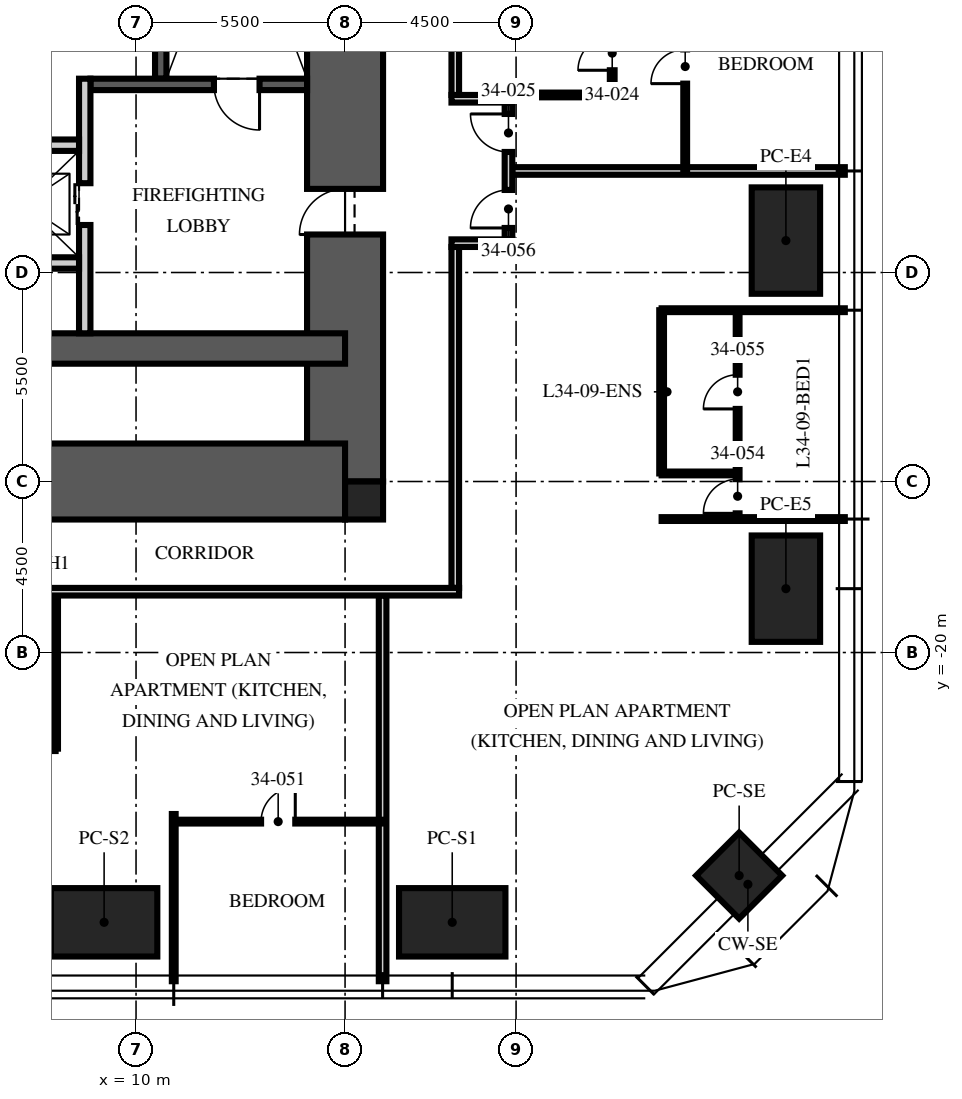
"""IFC4 building model, lengths in metres.
Left out: names, types, materials, properties, quantities, classifications, styles, units other than length and angle.
Written with IfcOpenShell. Run it as: python <this file> out.ifc"""

import sys

from ifc_helpers import new_model, si_unit, direction, frame, frame_2d, origin, origin_2d, place, context, subcontext, project, spatial, rectangle, extrude, element, fill, save


model = new_model("IFC4")
c1 = context("Model", 3, precision=1e-05, world=origin(), true_north=direction((0.0, 1.0)))
c2 = subcontext(c1, "Body", "Model", "MODEL_VIEW")
j1 = project(units=[si_unit("LENGTHUNIT", "METRE"), si_unit("PLANEANGLEUNIT", "RADIAN")], contexts=[c1])
p1 = place(None, origin())
s1 = spatial("IfcSite", under=j1, at=p1, CompositionType="ELEMENT")
p2 = place(p1, origin())
s2 = spatial("IfcBuilding", under=s1, at=p2, CompositionType="ELEMENT")
p3 = place(p2, frame((0.0, 0.0, 137.25)))
s3 = spatial("IfcBuildingStorey", under=s2, at=p3, CompositionType="ELEMENT", Elevation=137.25)
p4 = place(p3, frame((15.5, -15.5, -0.25), z_axis=(0.0, 0.0, 1.0), x_axis=(0.0, 1.0, 0.0)))
e1 = element("IfcWall", 1, at=p4, inside=s3, PredefinedType="SHEAR", context=c2, shape_type="SweptSolid", body=[
    extrude(rectangle(XDim=31.0, YDim=2.0, at=frame_2d((15.5, 0.0))), origin(), (0.0, 0.0, 1.0), 3.75),
])
p5 = place(p4, frame((6.5, 0.0, 0.25)))
e2 = element("IfcOpeningElement", 2, at=p5, cuts=e1, PredefinedType="OPENING", context=c2, shape_type="SweptSolid", body=[
    extrude(rectangle(XDim=1.2, YDim=2.1, at=frame_2d((0.6, 1.05))), frame((0.0, 1.01, 0.0), z_axis=(0.0, -1.0, 0.0), x_axis=(1.0, 0.0, 0.0)), (0.0, 0.0, 1.0), 2.02),
])
p6 = place(p4, frame((23.0, 0.0, 0.25)))
e3 = element("IfcOpeningElement", 3, at=p6, cuts=e1, PredefinedType="OPENING", context=c2, shape_type="SweptSolid", body=[
    extrude(rectangle(XDim=1.8, YDim=2.1, at=frame_2d((0.9, 1.05))), frame((0.0, 1.01, 0.0), z_axis=(0.0, -1.0, 0.0), x_axis=(1.0, 0.0, 0.0)), (0.0, 0.0, 1.0), 2.02),
])
p7 = place(p3, frame((-15.5, -15.5, -0.25), z_axis=(0.0, 0.0, 1.0), x_axis=(1.0, 0.0, 0.0)))
e4 = element("IfcWall", 4, at=p7, inside=s3, PredefinedType="SHEAR", context=c2, shape_type="SweptSolid", body=[
    extrude(rectangle(XDim=31.0, YDim=2.0, at=frame_2d((15.5, 0.0))), origin(), (0.0, 0.0, 1.0), 3.75),
])
p8 = place(p7, frame((10.4, 0.0, 0.25)))
e5 = element("IfcOpeningElement", 5, at=p8, cuts=e4, PredefinedType="OPENING", context=c2, shape_type="SweptSolid", body=[
    extrude(rectangle(XDim=1.1, YDim=2.1, at=frame_2d((0.55, 1.05))), frame((0.0, 1.01, 0.0), z_axis=(0.0, -1.0, 0.0), x_axis=(1.0, 0.0, 0.0)), (0.0, 0.0, 1.0), 2.02),
])
p9 = place(p7, frame((13.5, 0.0, 0.25)))
e6 = element("IfcOpeningElement", 6, at=p9, cuts=e4, PredefinedType="OPENING", context=c2, shape_type="SweptSolid", body=[
    extrude(rectangle(XDim=1.1, YDim=2.1, at=frame_2d((0.55, 1.05))), frame((0.0, 1.01, 0.0), z_axis=(0.0, -1.0, 0.0), x_axis=(1.0, 0.0, 0.0)), (0.0, 0.0, 1.0), 2.02),
])
p10 = place(p7, frame((16.6, 0.0, 0.25)))
e7 = element("IfcOpeningElement", 7, at=p10, cuts=e4, PredefinedType="OPENING", context=c2, shape_type="SweptSolid", body=[
    extrude(rectangle(XDim=1.1, YDim=2.1, at=frame_2d((0.55, 1.05))), frame((0.0, 1.01, 0.0), z_axis=(0.0, -1.0, 0.0), x_axis=(1.0, 0.0, 0.0)), (0.0, 0.0, 1.0), 2.02),
])
p11 = place(p3, frame((-15.5, -12.0, -0.25), z_axis=(0.0, 0.0, 1.0), x_axis=(1.0, 0.0, 0.0)))
e8 = element("IfcWall", 8, at=p11, inside=s3, PredefinedType="SHEAR", context=c2, shape_type="SweptSolid", body=[
    extrude(rectangle(XDim=31.0, YDim=0.8, at=frame_2d((15.5, 0.0))), origin(), (0.0, 0.0, 1.0), 3.75),
])
p12 = place(p3, frame((16.0, -16.0, -0.25), z_axis=(0.0, 0.0, 1.0), x_axis=(1.0, 0.0, 0.0)))
e9 = element("IfcColumn", 9, at=p12, inside=s3, PredefinedType="COLUMN", context=c2, shape_type="SweptSolid", body=[
    extrude(rectangle(XDim=1.0, YDim=1.0, at=origin_2d()), origin(), (0.0, 0.0, 1.0), 3.75),
])
for number, where, z_axis, x_axis in (
    (10, (27.1, -9.16, 0.0), (0.0, 0.0, 1.0), (0.0, 1.0, 0.0)),
    (11, (27.1, -18.32, 0.0), (0.0, 0.0, 1.0), (0.0, 1.0, 0.0)),
    (12, (18.32, -27.1, 0.0), (0.0, 0.0, 1.0), (1.0, 0.0, 0.0)),
    (13, (9.16, -27.1, 0.0), (0.0, 0.0, 1.0), (1.0, 0.0, 0.0)),
):
    element("IfcColumn", number, at=place(p3, frame(where, z_axis=z_axis, x_axis=x_axis)), inside=s3, PredefinedType="COLUMN", context=c2, shape_type="SweptSolid", body=[
        extrude(rectangle(XDim=2.8, YDim=1.8, at=origin_2d()), origin(), (0.0, 0.0, 1.0), 3.75),
    ])
p13 = place(p3, frame((25.87, -25.87, 0.0), z_axis=(0.0, 0.0, 1.0), x_axis=(0.707106781187, 0.707106781187, 0.0)))
e14 = element("IfcColumn", 14, at=p13, inside=s3, PredefinedType="COLUMN", context=c2, shape_type="SweptSolid", body=[
    extrude(rectangle(XDim=1.6, YDim=1.6, at=origin_2d()), origin(), (0.0, 0.0, 1.0), 3.75),
])
p14 = place(p3, frame((10.65, -4.9, 0.0), z_axis=(0.0, 0.0, 1.0), x_axis=(0.0, 1.0, 0.0)))
e15 = element("IfcWall", 15, at=p14, inside=s3, PredefinedType="SOLIDWALL", context=c2, shape_type="SweptSolid", body=[
    extrude(rectangle(XDim=10.1, YDim=0.3, at=frame_2d((5.05, 0.0))), origin(), (0.0, 0.0, 1.0), 3.5),
])
p15 = place(p3, frame((14.5, -5.05, 0.0), z_axis=(0.0, 0.0, 1.0), x_axis=(-1.0, 0.0, 0.0)))
e16 = element("IfcWall", 16, at=p15, inside=s3, PredefinedType="SOLIDWALL", context=c2, shape_type="SweptSolid", body=[
    extrude(rectangle(XDim=5.7, YDim=0.3, at=frame_2d((2.85, 0.0))), origin(), (0.0, 0.0, 1.0), 3.5),
])
p16 = place(p15, frame((1.25, 0.0, 0.0)))
e17 = element("IfcOpeningElement", 17, at=p16, cuts=e16, PredefinedType="OPENING", context=c2, shape_type="SweptSolid", body=[
    extrude(rectangle(XDim=1.2, YDim=2.1, at=frame_2d((0.6, 1.05))), frame((0.0, 0.16, 0.0), z_axis=(0.0, -1.0, 0.0), x_axis=(1.0, 0.0, 0.0)), (0.0, 0.0, 1.0), 0.32),
])
p17 = place(p3, frame((8.65, -11.6, 0.0), z_axis=(0.0, 0.0, 1.0), x_axis=(0.0, 1.0, 0.0)))
e18 = element("IfcWall", 18, at=p17, inside=s3, PredefinedType="PARTITIONING", context=c2, shape_type="SweptSolid", body=[
    extrude(rectangle(XDim=6.7, YDim=0.3, at=frame_2d((3.35, 0.0))), origin(), (0.0, 0.0, 1.0), 3.5),
])
p18 = place(p17, frame((2.85, 0.0, 0.0)))
e19 = element("IfcOpeningElement", 19, at=p18, cuts=e18, PredefinedType="OPENING", context=c2, shape_type="SweptSolid", body=[
    extrude(rectangle(XDim=1.1, YDim=2.1, at=frame_2d((0.55, 1.05))), frame((0.0, 0.16, 0.0), z_axis=(0.0, -1.0, 0.0), x_axis=(1.0, 0.0, 0.0)), (0.0, 0.0, 1.0), 0.32),
])
p19 = place(p3, frame((-8.5, -6.65, 0.0), z_axis=(0.0, 0.0, 1.0), x_axis=(1.0, 0.0, 0.0)))
e20 = element("IfcWall", 20, at=p19, inside=s3, PredefinedType="PARTITIONING", context=c2, shape_type="SweptSolid", body=[
    extrude(rectangle(XDim=17.0, YDim=0.3, at=frame_2d((8.5, 0.0))), origin(), (0.0, 0.0, 1.0), 3.5),
])
p20 = place(p19, frame((7.8, 0.0, 0.0)))
e21 = element("IfcOpeningElement", 21, at=p20, cuts=e20, PredefinedType="OPENING", context=c2, shape_type="SweptSolid", body=[
    extrude(rectangle(XDim=1.3, YDim=2.4, at=frame_2d((0.65, 1.2))), frame((0.0, 0.16, 0.0), z_axis=(0.0, -1.0, 0.0), x_axis=(1.0, 0.0, 0.0)), (0.0, 0.0, 1.0), 0.32),
])
p21 = place(p19, frame((5.65, 0.0, 0.0)))
e22 = element("IfcOpeningElement", 22, at=p21, cuts=e20, PredefinedType="OPENING", context=c2, shape_type="SweptSolid", body=[
    extrude(rectangle(XDim=0.9, YDim=2.1, at=frame_2d((0.45, 1.05))), frame((0.0, 0.16, 0.0), z_axis=(0.0, -1.0, 0.0), x_axis=(1.0, 0.0, 0.0)), (0.0, 0.0, 1.0), 0.32),
])
p22 = place(p19, frame((10.4, 0.0, 0.0)))
e23 = element("IfcOpeningElement", 23, at=p22, cuts=e20, PredefinedType="OPENING", context=c2, shape_type="SweptSolid", body=[
    extrude(rectangle(XDim=0.9, YDim=2.1, at=frame_2d((0.45, 1.05))), frame((0.0, 0.16, 0.0), z_axis=(0.0, -1.0, 0.0), x_axis=(1.0, 0.0, 0.0)), (0.0, 0.0, 1.0), 0.32),
])
p23 = place(p3, frame((5.6, -9.75, 0.0), z_axis=(0.0, 0.0, 1.0), x_axis=(1.0, 0.0, 0.0)))
e24 = element("IfcWall", 24, at=p23, inside=s3, PredefinedType="PARTITIONING", context=c2, shape_type="SweptSolid", body=[
    extrude(rectangle(XDim=2.9, YDim=0.3, at=frame_2d((1.45, 0.0))), origin(), (0.0, 0.0, 1.0), 3.5),
])
p24 = place(p3, frame((19.9, -7.328, 0.0), z_axis=(0.0, 0.0, 1.0), x_axis=(1.0, 0.0, 0.0)))
e25 = element("IfcWall", 25, at=p24, inside=s3, PredefinedType="PARTITIONING", context=c2, shape_type="SweptSolid", body=[
    extrude(rectangle(XDim=8.75, YDim=0.2, at=frame_2d((4.375, 0.0))), origin(), (0.0, 0.0, 1.0), 2.81),
])
p25 = place(p3, frame((10.992, -24.25, 0.0), z_axis=(0.0, 0.0, 1.0), x_axis=(0.0, -1.0, 0.0)))
e26 = element("IfcWall", 26, at=p25, inside=s3, PredefinedType="PARTITIONING", context=c2, shape_type="SweptSolid", body=[
    extrude(rectangle(XDim=4.4, YDim=0.1, at=frame_2d((2.2, 0.0))), origin(), (0.0, 0.0, 1.0), 2.81),
])
p26 = place(p3, frame((16.488, -18.5, 0.0), z_axis=(0.0, 0.0, 1.0), x_axis=(0.0, -1.0, 0.0)))
e27 = element("IfcWall", 27, at=p26, inside=s3, PredefinedType="PARTITIONING", context=c2, shape_type="SweptSolid", body=[
    extrude(rectangle(XDim=10.15, YDim=0.2, at=frame_2d((5.075, 0.0))), origin(), (0.0, 0.0, 1.0), 2.81),
])
for number, where, z_axis, x_axis in (
    (28, (23.83, -16.488, 0.0), (0.0, 0.0, 1.0), (1.0, 0.0, 0.0)),
    (29, (23.83, -10.992, 0.0), (0.0, 0.0, 1.0), (1.0, 0.0, 0.0)),
):
    element("IfcWall", number, at=place(p3, frame(where, z_axis=z_axis, x_axis=x_axis)), inside=s3, PredefinedType="PARTITIONING", context=c2, shape_type="SweptSolid", body=[
        extrude(rectangle(XDim=4.82, YDim=0.1, at=frame_2d((2.41, 0.0))), origin(), (0.0, 0.0, 1.0), 2.81),
    ])
p27 = place(p3, frame((24.45, -7.328, 0.0), z_axis=(0.0, 0.0, 1.0), x_axis=(0.0, 1.0, 0.0)))
e30 = element("IfcWall", 30, at=p27, inside=s3, PredefinedType="PARTITIONING", context=c2, shape_type="SweptSolid", body=[
    extrude(rectangle(XDim=5.496, YDim=0.1, at=frame_2d((2.748, 0.0))), origin(), (0.0, 0.0, 1.0), 2.81),
])
p28 = place(p27, frame((2.298, 0.0, 0.0)))
e31 = element("IfcOpeningElement", 31, at=p28, cuts=e30, PredefinedType="OPENING", context=c2, shape_type="SweptSolid", body=[
    extrude(rectangle(XDim=0.9, YDim=2.1, at=frame_2d((0.45, 1.05))), frame((0.0, 0.06, 0.0), z_axis=(0.0, -1.0, 0.0), x_axis=(1.0, 0.0, 0.0)), (0.0, 0.0, 1.0), 0.12),
])
p29 = place(p3, frame((22.53, -5.328, 0.0), z_axis=(0.0, 0.0, 1.0), x_axis=(0.0, 1.0, 0.0)))
e32 = element("IfcWall", 32, at=p29, inside=s3, PredefinedType="PARTITIONING", context=c2, shape_type="SweptSolid", body=[
    extrude(rectangle(XDim=2.2, YDim=0.125, at=frame_2d((1.1, 0.0))), origin(), (0.0, 0.0, 1.0), 2.81),
])
p30 = place(p29, frame((0.65, 0.0, 0.0)))
e33 = element("IfcOpeningElement", 33, at=p30, cuts=e32, PredefinedType="OPENING", context=c2, shape_type="SweptSolid", body=[
    extrude(rectangle(XDim=0.9, YDim=2.1, at=frame_2d((0.45, 1.05))), frame((0.0, 0.073, 0.0), z_axis=(0.0, -1.0, 0.0), x_axis=(1.0, 0.0, 0.0)), (0.0, 0.0, 1.0), 0.145),
])
p31 = place(p3, frame((19.97, -5.328, 0.0), z_axis=(0.0, 0.0, 1.0), x_axis=(1.0, 0.0, 0.0)))
e34 = element("IfcWall", 34, at=p31, inside=s3, PredefinedType="PARTITIONING", context=c2, shape_type="SweptSolid", body=[
    extrude(rectangle(XDim=2.56, YDim=0.125, at=frame_2d((1.28, 0.0))), origin(), (0.0, 0.0, 1.0), 3.5),
])
p32 = place(p3, frame((10.992, -24.45, 0.0), z_axis=(0.0, 0.0, 1.0), x_axis=(1.0, 0.0, 0.0)))
e35 = element("IfcWall", 35, at=p32, inside=s3, PredefinedType="PARTITIONING", context=c2, shape_type="SweptSolid", body=[
    extrude(rectangle(XDim=5.496, YDim=0.1, at=frame_2d((2.748, 0.0))), origin(), (0.0, 0.0, 1.0), 2.81),
])
p33 = place(p32, frame((2.298, 0.0, 0.0)))
e36 = element("IfcOpeningElement", 36, at=p33, cuts=e35, PredefinedType="OPENING", context=c2, shape_type="SweptSolid", body=[
    extrude(rectangle(XDim=0.9, YDim=2.1, at=frame_2d((0.45, 1.05))), frame((0.0, 0.06, 0.0), z_axis=(0.0, -1.0, 0.0), x_axis=(1.0, 0.0, 0.0)), (0.0, 0.0, 1.0), 0.12),
])
p34 = place(p3, frame((5.684, -22.53, 0.0), z_axis=(0.0, 0.0, 1.0), x_axis=(1.0, 0.0, 0.0)))
e37 = element("IfcWall", 37, at=p34, inside=s3, PredefinedType="PARTITIONING", context=c2, shape_type="SweptSolid", body=[
    extrude(rectangle(XDim=2.2, YDim=0.125, at=frame_2d((1.1, 0.0))), origin(), (0.0, 0.0, 1.0), 3.5),
])
p35 = place(p34, frame((0.65, 0.0, 0.0)))
e38 = element("IfcOpeningElement", 38, at=p35, cuts=e37, PredefinedType="OPENING", context=c2, shape_type="SweptSolid", body=[
    extrude(rectangle(XDim=0.9, YDim=2.1, at=frame_2d((0.45, 1.05))), frame((0.0, 0.073, 0.0), z_axis=(0.0, -1.0, 0.0), x_axis=(1.0, 0.0, 0.0)), (0.0, 0.0, 1.0), 0.145),
])
p36 = place(p3, frame((7.884, -18.5, 0.0), z_axis=(0.0, 0.0, 1.0), x_axis=(0.0, -1.0, 0.0)))
e39 = element("IfcWall", 39, at=p36, inside=s3, PredefinedType="PARTITIONING", context=c2, shape_type="SweptSolid", body=[
    extrude(rectangle(XDim=4.03, YDim=0.125, at=frame_2d((2.015, 0.0))), origin(), (0.0, 0.0, 1.0), 3.5),
])
p37 = place(p3, frame((25.83, -16.488, 0.0), z_axis=(0.0, 0.0, 1.0), x_axis=(0.0, 1.0, 0.0)))
e40 = element("IfcWall", 40, at=p37, inside=s3, PredefinedType="PARTITIONING", context=c2, shape_type="SweptSolid", body=[
    extrude(rectangle(XDim=5.496, YDim=0.1, at=frame_2d((2.748, 0.0))), origin(), (0.0, 0.0, 1.0), 2.81),
])
p38 = place(p37, frame((0.15, 0.0, 0.0)))
e41 = element("IfcOpeningElement", 41, at=p38, cuts=e40, PredefinedType="OPENING", context=c2, shape_type="SweptSolid", body=[
    extrude(rectangle(XDim=0.9, YDim=2.1, at=frame_2d((0.45, 1.05))), frame((0.0, 0.06, 0.0), z_axis=(0.0, -1.0, 0.0), x_axis=(1.0, 0.0, 0.0)), (0.0, 0.0, 1.0), 0.12),
])
p39 = place(p37, frame((2.898, 0.0, 0.0)))
e42 = element("IfcOpeningElement", 42, at=p39, cuts=e40, PredefinedType="OPENING", context=c2, shape_type="SweptSolid", body=[
    extrude(rectangle(XDim=0.9, YDim=2.1, at=frame_2d((0.45, 1.05))), frame((0.0, 0.06, 0.0), z_axis=(0.0, -1.0, 0.0), x_axis=(1.0, 0.0, 0.0)), (0.0, 0.0, 1.0), 0.12),
])
p40 = place(p3, frame((23.83, -15.288, 0.0), z_axis=(0.0, 0.0, 1.0), x_axis=(1.0, 0.0, 0.0)))
e43 = element("IfcWall", 43, at=p40, inside=s3, PredefinedType="PARTITIONING", context=c2, shape_type="SweptSolid", body=[
    extrude(rectangle(XDim=2.0, YDim=0.1, at=frame_2d((1.0, 0.0))), origin(), (0.0, 0.0, 1.0), 3.5),
])
p41 = place(p3, frame((23.83, -15.288, 0.0), z_axis=(0.0, 0.0, 1.0), x_axis=(0.0, 1.0, 0.0)))
e44 = element("IfcWall", 44, at=p41, inside=s3, PredefinedType="PARTITIONING", context=c2, shape_type="SweptSolid", body=[
    extrude(rectangle(XDim=4.296, YDim=0.125, at=frame_2d((2.148, 0.0))), origin(), (0.0, 0.0, 1.0), 2.81),
])
p42 = place(p3, frame((18.4, -18.3, 0.0), z_axis=(0.0, 0.0, 1.0), x_axis=(0.0, 1.0, 0.0)))
e45 = element("IfcWall", 45, at=p42, inside=s3, PredefinedType="PARTITIONING", context=c2, shape_type="SweptSolid", body=[
    extrude(rectangle(XDim=8.972, YDim=0.2, at=frame_2d((4.486, 0.0))), origin(), (0.0, 0.0, 1.0), 2.3),
])
p43 = place(p3, frame((18.3, -9.228, 0.0), z_axis=(0.0, 0.0, 1.0), x_axis=(1.0, 0.0, 0.0)))
e46 = element("IfcWall", 46, at=p43, inside=s3, PredefinedType="PARTITIONING", context=c2, shape_type="SweptSolid", body=[
    extrude(rectangle(XDim=1.6, YDim=0.2, at=frame_2d((0.8, 0.0))), origin(), (0.0, 0.0, 1.0), 2.7),
])
p44 = place(p3, frame((18.3, -5.428, 0.0), z_axis=(0.0, 0.0, 1.0), x_axis=(1.0, 0.0, 0.0)))
e47 = element("IfcWall", 47, at=p44, inside=s3, PredefinedType="PARTITIONING", context=c2, shape_type="SweptSolid", body=[
    extrude(rectangle(XDim=1.6, YDim=0.2, at=frame_2d((0.8, 0.0))), origin(), (0.0, 0.0, 1.0), 3.5),
])
p45 = place(p3, frame((19.8, -9.128, 0.0), z_axis=(0.0, 0.0, 1.0), x_axis=(0.0, 1.0, 0.0)))
e48 = element("IfcWall", 48, at=p45, inside=s3, PredefinedType="PARTITIONING", context=c2, shape_type="SweptSolid", body=[
    extrude(rectangle(XDim=3.6, YDim=0.2, at=frame_2d((1.8, 0.0))), origin(), (0.0, 0.0, 1.0), 2.7),
])
p46 = place(p45, frame((2.3, 0.0, 0.0)))
e49 = element("IfcOpeningElement", 49, at=p46, cuts=e48, PredefinedType="OPENING", context=c2, shape_type="SweptSolid", body=[
    extrude(rectangle(XDim=1.0, YDim=2.2, at=frame_2d((0.5, 1.1))), frame((0.0, 0.11, 0.0), z_axis=(0.0, -1.0, 0.0), x_axis=(1.0, 0.0, 0.0)), (0.0, 0.0, 1.0), 0.22),
])
p47 = place(p45, frame((0.3, 0.0, 0.0)))
e50 = element("IfcOpeningElement", 50, at=p47, cuts=e48, PredefinedType="OPENING", context=c2, shape_type="SweptSolid", body=[
    extrude(rectangle(XDim=1.0, YDim=2.2, at=frame_2d((0.5, 1.1))), frame((0.0, 0.11, 0.0), z_axis=(0.0, -1.0, 0.0), x_axis=(1.0, 0.0, 0.0)), (0.0, 0.0, 1.0), 0.22),
])
p48 = place(p3, frame((18.4, -5.328, 0.0), z_axis=(0.0, 0.0, 1.0), x_axis=(0.0, 1.0, 0.0)))
e51 = element("IfcWall", 51, at=p48, inside=s3, PredefinedType="PARTITIONING", context=c2, shape_type="SweptSolid", body=[
    extrude(rectangle(XDim=14.32, YDim=0.2, at=frame_2d((7.16, 0.0))), origin(), (0.0, 0.0, 1.0), 2.7),
])
p49 = place(p3, frame((18.5, -18.4, 0.0), z_axis=(0.0, 0.0, 1.0), x_axis=(-1.0, 0.0, 0.0)))
e52 = element("IfcWall", 52, at=p49, inside=s3, PredefinedType="PARTITIONING", context=c2, shape_type="SweptSolid", body=[
    extrude(rectangle(XDim=12.9, YDim=0.2, at=frame_2d((6.45, 0.0))), origin(), (0.0, 0.0, 1.0), 2.3),
])
p50 = place(p16, origin())
e53 = element("IfcDoor", 53, at=p50, inside=s3, OperationType="SINGLE_SWING_LEFT", PredefinedType="DOOR", context=c2, shape_type="SweptSolid", body=[
    extrude(rectangle(XDim=1.2, YDim=2.1, at=frame_2d((0.6, 1.05))), frame((0.0, 0.025, 0.0), z_axis=(0.0, -1.0, 0.0), x_axis=(1.0, 0.0, 0.0)), (0.0, 0.0, 1.0), 0.05),
])
fill(e17, e53)
p51 = place(p5, origin())
e54 = element("IfcDoor", 54, at=p51, inside=s3, OperationType="SINGLE_SWING_LEFT", PredefinedType="DOOR", context=c2, shape_type="SweptSolid", body=[
    extrude(rectangle(XDim=1.2, YDim=2.1, at=frame_2d((0.6, 1.05))), frame((0.0, 0.025, 0.0), z_axis=(0.0, -1.0, 0.0), x_axis=(1.0, 0.0, 0.0)), (0.0, 0.0, 1.0), 0.05),
])
fill(e2, e54)
p52 = place(p18, origin())
e55 = element("IfcDoor", 55, at=p52, inside=s3, OperationType="DOUBLE_DOOR_SLIDING", PredefinedType="DOOR", context=c2, shape_type="SweptSolid", body=[
    extrude(rectangle(XDim=1.1, YDim=2.1, at=frame_2d((0.55, 1.05))), frame((0.0, 0.025, 0.0), z_axis=(0.0, -1.0, 0.0), x_axis=(1.0, 0.0, 0.0)), (0.0, 0.0, 1.0), 0.05),
])
fill(e19, e55)
p53 = place(p28, origin())
e56 = element("IfcDoor", 56, at=p53, inside=s3, OperationType="SINGLE_SWING_LEFT", PredefinedType="DOOR", context=c2, shape_type="SweptSolid", body=[
    extrude(rectangle(XDim=0.9, YDim=2.1, at=frame_2d((0.45, 1.05))), frame((0.0, 0.025, 0.0), z_axis=(0.0, -1.0, 0.0), x_axis=(1.0, 0.0, 0.0)), (0.0, 0.0, 1.0), 0.05),
])
fill(e31, e56)
p54 = place(p30, origin())
e57 = element("IfcDoor", 57, at=p54, inside=s3, OperationType="SINGLE_SWING_LEFT", PredefinedType="DOOR", context=c2, shape_type="SweptSolid", body=[
    extrude(rectangle(XDim=0.9, YDim=2.1, at=frame_2d((0.45, 1.05))), frame((0.0, 0.025, 0.0), z_axis=(0.0, -1.0, 0.0), x_axis=(1.0, 0.0, 0.0)), (0.0, 0.0, 1.0), 0.05),
])
fill(e33, e57)
p55 = place(p46, origin())
e58 = element("IfcDoor", 58, at=p55, inside=s3, OperationType="SINGLE_SWING_RIGHT", PredefinedType="DOOR", context=c2, shape_type="SweptSolid", body=[
    extrude(rectangle(XDim=1.0, YDim=2.2, at=frame_2d((0.5, 1.1))), frame((0.0, 0.025, 0.0), z_axis=(0.0, -1.0, 0.0), x_axis=(1.0, 0.0, 0.0)), (0.0, 0.0, 1.0), 0.05),
])
fill(e49, e58)
p56 = place(p33, origin())
e59 = element("IfcDoor", 59, at=p56, inside=s3, OperationType="SINGLE_SWING_RIGHT", PredefinedType="DOOR", context=c2, shape_type="SweptSolid", body=[
    extrude(rectangle(XDim=0.9, YDim=2.1, at=frame_2d((0.45, 1.05))), frame((0.0, 0.025, 0.0), z_axis=(0.0, -1.0, 0.0), x_axis=(1.0, 0.0, 0.0)), (0.0, 0.0, 1.0), 0.05),
])
fill(e36, e59)
p57 = place(p38, origin())
e60 = element("IfcDoor", 60, at=p57, inside=s3, OperationType="SINGLE_SWING_LEFT", PredefinedType="DOOR", context=c2, shape_type="SweptSolid", body=[
    extrude(rectangle(XDim=0.9, YDim=2.1, at=frame_2d((0.45, 1.05))), frame((0.0, 0.025, 0.0), z_axis=(0.0, -1.0, 0.0), x_axis=(1.0, 0.0, 0.0)), (0.0, 0.0, 1.0), 0.05),
])
fill(e41, e60)
p58 = place(p39, origin())
e61 = element("IfcDoor", 61, at=p58, inside=s3, OperationType="SINGLE_SWING_LEFT", PredefinedType="DOOR", context=c2, shape_type="SweptSolid", body=[
    extrude(rectangle(XDim=0.9, YDim=2.1, at=frame_2d((0.45, 1.05))), frame((0.0, 0.025, 0.0), z_axis=(0.0, -1.0, 0.0), x_axis=(1.0, 0.0, 0.0)), (0.0, 0.0, 1.0), 0.05),
])
fill(e42, e61)
p59 = place(p47, origin())
e62 = element("IfcDoor", 62, at=p59, inside=s3, OperationType="SINGLE_SWING_LEFT", PredefinedType="DOOR", context=c2, shape_type="SweptSolid", body=[
    extrude(rectangle(XDim=1.0, YDim=2.2, at=frame_2d((0.5, 1.1))), frame((0.0, 0.025, 0.0), z_axis=(0.0, -1.0, 0.0), x_axis=(1.0, 0.0, 0.0)), (0.0, 0.0, 1.0), 0.05),
])
fill(e50, e62)
save(model, sys.argv[1])
